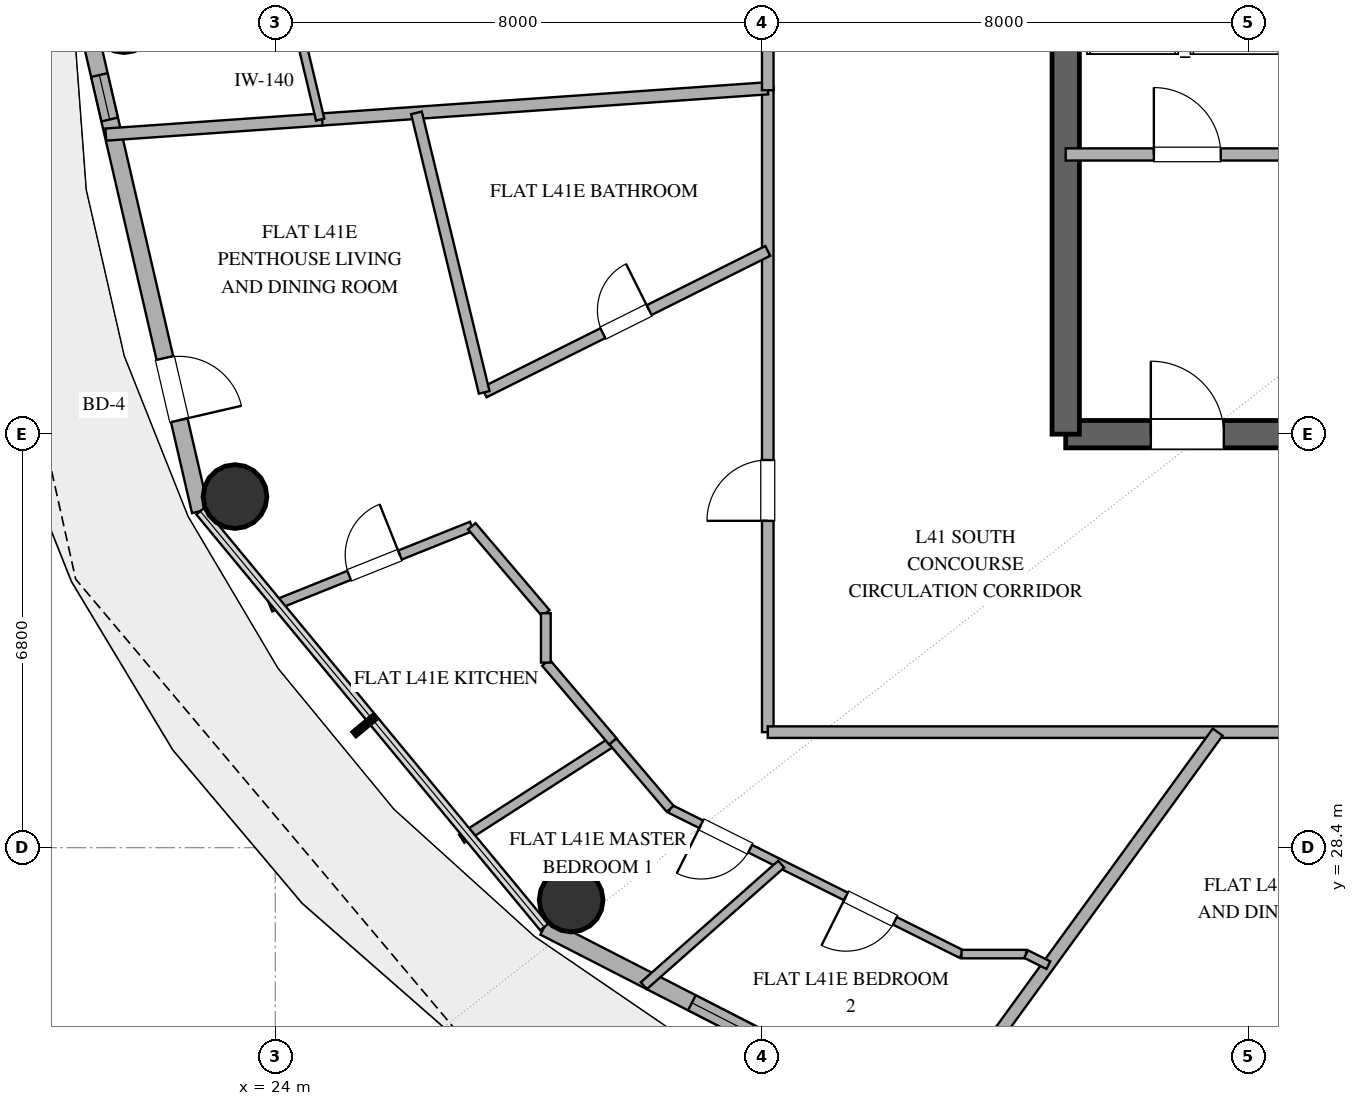
"""IFC4 building model, lengths in metres.
Left out: names, types, materials, properties, quantities, classifications, styles, units other than length and angle.
Written with IfcOpenShell. Run it as: python <this file> out.ifc"""

import sys

from ifc_helpers import new_model, si_unit, direction, frame, frame_2d, origin, origin_2d, place, context, subcontext, project, spatial, rectangle, hollow_circle, extrude, element, fill, save


model = new_model("IFC4")
c1 = context("Model", 3, precision=1e-05, world=origin(), true_north=direction((0.0, 1.0)))
c2 = subcontext(c1, "Body", "Model", "MODEL_VIEW")
j1 = project(units=[si_unit("LENGTHUNIT", "METRE"), si_unit("PLANEANGLEUNIT", "RADIAN")], contexts=[c1])
p1 = place(None, origin())
s1 = spatial("IfcSite", under=j1, at=p1, CompositionType="ELEMENT")
p2 = place(p1, origin())
s2 = spatial("IfcBuilding", under=s1, at=p2, CompositionType="ELEMENT")
p3 = place(p2, frame((0.0, 0.0, 165.0)))
s3 = spatial("IfcBuildingStorey", under=s2, at=p3, CompositionType="ELEMENT", Elevation=165.0)
p4 = place(p3, frame((37.0, 35.2, 0.0), z_axis=(0.0, 0.0, 1.0), x_axis=(1.0, 0.0, 0.0)))
e1 = element("IfcWall", 1, at=p4, inside=s3, PredefinedType="SHEAR", context=c2, shape_type="SweptSolid", body=[
    extrude(rectangle(XDim=4.0, YDim=0.45, at=frame_2d((2.0, 0.0))), origin(), (0.0, 0.0, 1.0), 3.38),
])
p5 = place(p4, frame((1.4, 0.0, 0.0)))
e2 = element("IfcOpeningElement", 2, at=p5, cuts=e1, PredefinedType="OPENING", context=c2, shape_type="SweptSolid", body=[
    extrude(rectangle(XDim=1.2, YDim=2.15, at=frame_2d((0.6, 1.075))), frame((0.0, 0.235, 0.0), z_axis=(0.0, -1.0, 0.0), x_axis=(1.0, 0.0, 0.0)), (0.0, 0.0, 1.0), 0.47),
])
p6 = place(p3, frame((37.0, 35.2, 0.0), z_axis=(0.0, 0.0, 1.0), x_axis=(0.0, 1.0, 0.0)))
e3 = element("IfcWall", 3, at=p6, inside=s3, PredefinedType="SHEAR", context=c2, shape_type="SweptSolid", body=[
    extrude(rectangle(XDim=13.6, YDim=0.45, at=frame_2d((6.8, 0.0))), origin(), (0.0, 0.0, 1.0), 3.38),
])
for number, where, z_axis, x_axis in (
    (4, (21.513, 42.0, 0.0), (0.0, 0.0, 1.0), (1.0, 0.0, 0.0)),
    (5, (23.338, 34.174, 0.0), (0.0, 0.0, 1.0), (1.0, 0.0, 0.0)),
    (6, (28.866, 27.54, 0.0), (0.0, 0.0, 1.0), (1.0, 0.0, 0.0)),
):
    element("IfcColumn", number, at=place(p3, frame(where, z_axis=z_axis, x_axis=x_axis)), inside=s3, PredefinedType="COLUMN", context=c2, shape_type="SweptSolid", body=[
        extrude(hollow_circle(Radius=0.525, WallThickness=0.028, at=origin_2d()), origin(), (0.0, 0.0, 1.0), 3.38),
    ])
p7 = place(p3, frame((20.901, 42.0, 0.0), z_axis=(0.0, 0.0, 1.0), x_axis=(0.225473184558, -0.974249374157, 0.0)))
e7 = element("IfcWall", 7, at=p7, inside=s3, PredefinedType="SOLIDWALL", context=c2, shape_type="SweptSolid", body=[
    extrude(rectangle(XDim=8.28, YDim=0.28, at=frame_2d((4.14, 0.0))), origin(), (0.0, 0.0, 1.0), 3.38),
])
p8 = place(p7, frame((5.694, 0.0, 0.0)))
e8 = element("IfcOpeningElement", 8, at=p8, cuts=e7, PredefinedType="OPENING", context=c2, shape_type="SweptSolid", body=[
    extrude(rectangle(XDim=1.05, YDim=2.2, at=frame_2d((0.525, 1.1))), frame((0.0, 0.15, 0.0), z_axis=(0.0, -1.0, 0.0), x_axis=(1.0, 0.0, 0.0)), (0.0, 0.0, 1.0), 0.3),
])
p9 = place(p7, frame((0.918, 0.0, 0.85)))
e9 = element("IfcOpeningElement", 9, at=p9, cuts=e7, PredefinedType="OPENING", context=c2, shape_type="SweptSolid", body=[
    extrude(rectangle(XDim=0.75, YDim=1.8, at=frame_2d((0.375, 0.9))), frame((0.0, 0.15, 0.0), z_axis=(0.0, -1.0, 0.0), x_axis=(1.0, 0.0, 0.0)), (0.0, 0.0, 1.0), 0.3),
])
p10 = place(p3, frame((28.424, 27.094, 0.0), z_axis=(0.0, 0.0, 1.0), x_axis=(0.889872523182, -0.456209263919, 0.0)))
e10 = element("IfcWall", 10, at=p10, inside=s3, PredefinedType="SOLIDWALL", context=c2, shape_type="SweptSolid", body=[
    extrude(rectangle(XDim=10.016, YDim=0.28, at=frame_2d((5.008, 0.0))), origin(), (0.0, 0.0, 1.0), 3.38),
])
p11 = place(p10, frame((2.729, 0.0, 0.85)))
e11 = element("IfcOpeningElement", 11, at=p11, cuts=e10, PredefinedType="OPENING", context=c2, shape_type="SweptSolid", body=[
    extrude(rectangle(XDim=1.5, YDim=1.8, at=frame_2d((0.75, 0.9))), frame((0.0, 0.15, 0.0), z_axis=(0.0, -1.0, 0.0), x_axis=(1.0, 0.0, 0.0)), (0.0, 0.0, 1.0), 0.3),
])
p12 = place(p10, frame((4.811, 0.0, 0.85)))
e12 = element("IfcOpeningElement", 12, at=p12, cuts=e10, PredefinedType="OPENING", context=c2, shape_type="SweptSolid", body=[
    extrude(rectangle(XDim=1.5, YDim=1.8, at=frame_2d((0.75, 0.9))), frame((0.0, 0.15, 0.0), z_axis=(0.0, -1.0, 0.0), x_axis=(1.0, 0.0, 0.0)), (0.0, 0.0, 1.0), 0.3),
])
p13 = place(p10, frame((7.479, 0.0, 0.85)))
e13 = element("IfcOpeningElement", 13, at=p13, cuts=e10, PredefinedType="OPENING", context=c2, shape_type="SweptSolid", body=[
    extrude(rectangle(XDim=1.0, YDim=1.8, at=frame_2d((0.5, 0.9))), frame((0.0, 0.15, 0.0), z_axis=(0.0, -1.0, 0.0), x_axis=(1.0, 0.0, 0.0)), (0.0, 0.0, 1.0), 0.3),
])
p14 = place(p3, frame((37.0, 39.8, 0.0), z_axis=(0.0, 0.0, 1.0), x_axis=(1.0, 0.0, 0.0)))
e14 = element("IfcWall", 14, at=p14, inside=s3, PredefinedType="SOLIDWALL", context=c2, shape_type="SweptSolid", body=[
    extrude(rectangle(XDim=4.0, YDim=0.2, at=frame_2d((2.0, 0.0))), origin(), (0.0, 0.0, 1.0), 2.74),
])
p15 = place(p14, frame((1.45, 0.0, 0.0)))
e15 = element("IfcOpeningElement", 15, at=p15, cuts=e14, PredefinedType="OPENING", context=c2, shape_type="SweptSolid", body=[
    extrude(rectangle(XDim=1.1, YDim=2.15, at=frame_2d((0.55, 1.075))), frame((0.0, 0.11, 0.0), z_axis=(0.0, -1.0, 0.0), x_axis=(1.0, 0.0, 0.0)), (0.0, 0.0, 1.0), 0.22),
])
p16 = place(p3, frame((32.1, 30.3, 0.0), z_axis=(0.0, 0.0, 1.0), x_axis=(0.0, 1.0, 0.0)))
e16 = element("IfcWall", 16, at=p16, inside=s3, PredefinedType="PARTITIONING", context=c2, shape_type="SweptSolid", body=[
    extrude(rectangle(XDim=10.62, YDim=0.19, at=frame_2d((5.31, 0.0))), origin(), (0.0, 0.0, 1.0), 2.74),
])
p17 = place(p16, frame((3.475, 0.0, 0.0)))
e17 = element("IfcOpeningElement", 17, at=p17, cuts=e16, PredefinedType="OPENING", context=c2, shape_type="SweptSolid", body=[
    extrude(rectangle(XDim=1.0, YDim=2.2, at=frame_2d((0.5, 1.1))), frame((0.0, 0.105, 0.0), z_axis=(0.0, -1.0, 0.0), x_axis=(1.0, 0.0, 0.0)), (0.0, 0.0, 1.0), 0.21),
])
p18 = place(p3, frame((48.308, 30.3, 0.0), z_axis=(0.0, 0.0, 1.0), x_axis=(-1.0, 0.0, 0.0)))
e18 = element("IfcWall", 18, at=p18, inside=s3, PredefinedType="PARTITIONING", context=c2, shape_type="SweptSolid", body=[
    extrude(rectangle(XDim=16.208, YDim=0.19, at=frame_2d((8.104, 0.0))), origin(), (0.0, 0.0, 1.0), 2.74),
])
p19 = place(p18, frame((5.52, 0.0, 0.0)))
e19 = element("IfcOpeningElement", 19, at=p19, cuts=e18, PredefinedType="OPENING", context=c2, shape_type="SweptSolid", body=[
    extrude(rectangle(XDim=1.0, YDim=2.2, at=frame_2d((0.5, 1.1))), frame((0.0, 0.105, 0.0), z_axis=(0.0, -1.0, 0.0), x_axis=(1.0, 0.0, 0.0)), (0.0, 0.0, 1.0), 0.21),
])
p20 = place(p3, frame((32.1, 40.888, 0.0), z_axis=(0.0, 0.0, 1.0), x_axis=(-0.997562906323, -0.069772830877, 0.0)))
e20 = element("IfcWall", 20, at=p20, inside=s3, PredefinedType="PARTITIONING", context=c2, shape_type="SweptSolid", body=[
    extrude(rectangle(XDim=7.38, YDim=0.2, at=frame_2d((3.69, 0.0))), origin(), (0.0, 0.0, 1.0), 2.74),
])
p21 = place(p3, frame((32.1, 40.856, 0.0), z_axis=(0.0, 0.0, 1.0), x_axis=(0.0, 1.0, 0.0)))
e21 = element("IfcWall", 21, at=p21, inside=s3, PredefinedType="PARTITIONING", context=c2, shape_type="SweptSolid", body=[
    extrude(rectangle(XDim=12.844, YDim=0.19, at=frame_2d((6.422, 0.0))), origin(), (0.0, 0.0, 1.0), 2.74),
])
p22 = place(p3, frame((27.436, 35.887, 0.0), z_axis=(0.0, 0.0, 1.0), x_axis=(0.894857716432, 0.446351506485, 0.0)))
e22 = element("IfcWall", 22, at=p22, inside=s3, PredefinedType="PLUMBINGWALL", context=c2, shape_type="SweptSolid", body=[
    extrude(rectangle(XDim=5.212, YDim=0.18, at=frame_2d((2.606, 0.0))), origin(), (0.0, 0.0, 1.0), 2.74),
])
p23 = place(p22, frame((2.181, 0.0, 0.0)))
e23 = element("IfcOpeningElement", 23, at=p23, cuts=e22, PredefinedType="OPENING", context=c2, shape_type="SweptSolid", body=[
    extrude(rectangle(XDim=0.85, YDim=2.1, at=frame_2d((0.425, 1.05))), frame((0.0, 0.1, 0.0), z_axis=(0.0, -1.0, 0.0), x_axis=(1.0, 0.0, 0.0)), (0.0, 0.0, 1.0), 0.2),
])
p24 = place(p3, frame((34.726, 23.73, 0.0), z_axis=(0.0, 0.0, 1.0), x_axis=(0.587785528328, 0.809016793823, 0.0)))
e24 = element("IfcWall", 24, at=p24, inside=s3, PredefinedType="PARTITIONING", context=c2, shape_type="SweptSolid", body=[
    extrude(rectangle(XDim=8.121, YDim=0.2, at=frame_2d((4.061, 0.0))), origin(), (0.0, 0.0, 1.0), 2.74),
])
p25 = place(p3, frame((26.322, 40.484, 0.0), z_axis=(0.0, 0.0, 1.0), x_axis=(0.235484788327, -0.971878034769, 0.0)))
e25 = element("IfcWall", 25, at=p25, inside=s3, PredefinedType="PLUMBINGWALL", context=c2, shape_type="SweptSolid", body=[
    extrude(rectangle(XDim=4.73, YDim=0.18, at=frame_2d((2.365, 0.0))), origin(), (0.0, 0.0, 1.0), 2.74),
])
p26 = place(p3, frame((23.921, 32.36, 0.0), z_axis=(0.0, 0.0, 1.0), x_axis=(0.928353942887, 0.371697399408, 0.0)))
e26 = element("IfcWall", 26, at=p26, inside=s3, PredefinedType="PLUMBINGWALL", context=c2, shape_type="SweptSolid", body=[
    extrude(rectangle(XDim=3.568, YDim=0.16, at=frame_2d((1.784, 0.0))), origin(), (0.0, 0.0, 1.0), 2.74),
])
p27 = place(p26, frame((1.394, 0.0, 0.0)))
e27 = element("IfcOpeningElement", 27, at=p27, cuts=e26, PredefinedType="OPENING", context=c2, shape_type="SweptSolid", body=[
    extrude(rectangle(XDim=0.9, YDim=2.1, at=frame_2d((0.45, 1.05))), frame((0.0, 0.09, 0.0), z_axis=(0.0, -1.0, 0.0), x_axis=(1.0, 0.0, 0.0)), (0.0, 0.0, 1.0), 0.18),
])
p28 = place(p3, frame((21.212, 40.127, 0.0), z_axis=(0.0, 0.0, 1.0), x_axis=(0.997565256009, 0.069739228586, 0.0)))
e28 = element("IfcWall", 28, at=p28, inside=s3, PredefinedType="PARTITIONING", context=c2, shape_type="SweptSolid", body=[
    extrude(rectangle(XDim=3.567, YDim=0.2, at=frame_2d((1.784, 0.0))), origin(), (0.0, 0.0, 1.0), 2.74),
])
p29 = place(p3, frame((35.287, 26.65, 0.0), z_axis=(0.0, 0.0, 1.0), x_axis=(-0.894937323042, 0.44619187333, 0.0)))
e29 = element("IfcWall", 29, at=p29, inside=s3, PredefinedType="PARTITIONING", context=c2, shape_type="SweptSolid", body=[
    extrude(rectangle(XDim=5.354, YDim=0.14, at=frame_2d((2.677, 0.0))), origin(), (0.0, 0.0, 1.0), 2.74),
])
p30 = place(p29, frame((1.224, 0.0, 0.0)))
e30 = element("IfcOpeningElement", 30, at=p30, cuts=e29, PredefinedType="OPENING", context=c2, shape_type="SweptSolid", body=[
    extrude(rectangle(XDim=0.9, YDim=2.1, at=frame_2d((0.45, 1.05))), frame((0.0, 0.08, 0.0), z_axis=(0.0, -1.0, 0.0), x_axis=(1.0, 0.0, 0.0)), (0.0, 0.0, 1.0), 0.16),
])
p31 = place(p29, frame((3.884, 0.0, 0.0)))
e31 = element("IfcOpeningElement", 31, at=p31, cuts=e29, PredefinedType="OPENING", context=c2, shape_type="SweptSolid", body=[
    extrude(rectangle(XDim=0.9, YDim=2.1, at=frame_2d((0.45, 1.05))), frame((0.0, 0.08, 0.0), z_axis=(0.0, -1.0, 0.0), x_axis=(1.0, 0.0, 0.0)), (0.0, 0.0, 1.0), 0.16),
])
p32 = place(p3, frame((32.321, 28.128, 0.0), z_axis=(0.0, 0.0, 1.0), x_axis=(-0.748956405403, -0.6626192744, 0.0)))
e32 = element("IfcWall", 32, at=p32, inside=s3, PredefinedType="PARTITIONING", context=c2, shape_type="SweptSolid", body=[
    extrude(rectangle(XDim=3.017, YDim=0.15, at=frame_2d((1.509, 0.0))), origin(), (0.0, 0.0, 1.0), 2.74),
])
p33 = place(p3, frame((29.553, 30.146, 0.0), z_axis=(0.0, 0.0, 1.0), x_axis=(-0.841296531109, -0.540573904978, 0.0)))
e33 = element("IfcWall", 33, at=p33, inside=s3, PredefinedType="PLUMBINGWALL", context=c2, shape_type="SweptSolid", body=[
    extrude(rectangle(XDim=2.956, YDim=0.16, at=frame_2d((1.478, 0.0))), origin(), (0.0, 0.0, 1.0), 2.74),
])
p34 = place(p3, frame((27.233, 33.686, 0.0), z_axis=(0.0, 0.0, 1.0), x_axis=(0.648078524475, -0.761573519835, 0.0)))
e34 = element("IfcWall", 34, at=p34, inside=s3, PredefinedType="PLUMBINGWALL", context=c2, shape_type="SweptSolid", body=[
    extrude(rectangle(XDim=1.878, YDim=0.16, at=frame_2d((0.939, 0.0))), origin(), (0.0, 0.0, 1.0), 2.74),
])
p35 = place(p3, frame((28.45, 31.443, 0.0), z_axis=(0.0, 0.0, 1.0), x_axis=(0.64788149294, -0.761741144422, 0.0)))
e35 = element("IfcWall", 35, at=p35, inside=s3, PredefinedType="PLUMBINGWALL", context=c2, shape_type="SweptSolid", body=[
    extrude(rectangle(XDim=1.702, YDim=0.16, at=frame_2d((0.851, 0.0))), origin(), (0.0, 0.0, 1.0), 2.74),
])
p36 = place(p3, frame((24.739, 40.373, 0.0), z_axis=(0.0, 0.0, 1.0), x_axis=(-0.231561310927, 0.972820311919, 0.0)))
e36 = element("IfcWall", 36, at=p36, inside=s3, PredefinedType="PARTITIONING", context=c2, shape_type="SweptSolid", body=[
    extrude(rectangle(XDim=1.672, YDim=0.14, at=frame_2d((0.836, 0.0))), origin(), (0.0, 0.0, 1.0), 2.74),
])
p37 = place(p3, frame((29.553, 30.146, 0.0), z_axis=(0.0, 0.0, 1.0), x_axis=(0.647896934681, -0.761728010533, 0.0)))
e37 = element("IfcWall", 37, at=p37, inside=s3, PredefinedType="PARTITIONING", context=c2, shape_type="SweptSolid", body=[
    extrude(rectangle(XDim=1.454, YDim=0.15, at=frame_2d((0.727, 0.0))), origin(), (0.0, 0.0, 1.0), 2.74),
])
p38 = place(p3, frame((36.349, 26.65, 0.0), z_axis=(0.0, 0.0, 1.0), x_axis=(-1.0, 0.0, 0.0)))
e38 = element("IfcWall", 38, at=p38, inside=s3, PredefinedType="PARTITIONING", context=c2, shape_type="SweptSolid", body=[
    extrude(rectangle(XDim=1.062, YDim=0.14, at=frame_2d((0.531, 0.0))), origin(), (0.0, 0.0, 1.0), 2.74),
])
p39 = place(p3, frame((28.45, 32.256, 0.0), z_axis=(0.0, 0.0, 1.0), x_axis=(0.0, -1.0, 0.0)))
e39 = element("IfcWall", 39, at=p39, inside=s3, PredefinedType="PLUMBINGWALL", context=c2, shape_type="SweptSolid", body=[
    extrude(rectangle(XDim=0.812, YDim=0.16, at=frame_2d((0.406, 0.0))), origin(), (0.0, 0.0, 1.0), 2.74),
])
p40 = place(p3, frame((36.715, 26.468, 0.0), z_axis=(0.0, 0.0, 1.0), x_axis=(-0.895142158028, 0.445780794698, 0.0)))
e40 = element("IfcWall", 40, at=p40, inside=s3, PredefinedType="PARTITIONING", context=c2, shape_type="SweptSolid", body=[
    extrude(rectangle(XDim=0.409, YDim=0.14, at=frame_2d((0.205, 0.0))), origin(), (0.0, 0.0, 1.0), 2.74),
])
p41 = place(p8, origin())
e41 = element("IfcDoor", 41, at=p41, inside=s3, OperationType="SINGLE_SWING_RIGHT", PredefinedType="DOOR", context=c2, shape_type="SweptSolid", body=[
    extrude(rectangle(XDim=1.05, YDim=2.2, at=frame_2d((0.525, 1.1))), frame((0.0, 0.025, 0.0), z_axis=(0.0, -1.0, 0.0), x_axis=(1.0, 0.0, 0.0)), (0.0, 0.0, 1.0), 0.05),
])
fill(e8, e41)
p42 = place(p11, origin())
e42 = element("IfcWindow", 42, at=p42, inside=s3, PartitioningType="SINGLE_PANEL", PredefinedType="WINDOW", context=c2, shape_type="SweptSolid", body=[
    extrude(rectangle(XDim=1.5, YDim=1.8, at=frame_2d((0.75, 0.9))), frame((0.0, 0.03, 0.0), z_axis=(0.0, -1.0, 0.0), x_axis=(1.0, 0.0, 0.0)), (0.0, 0.0, 1.0), 0.06),
])
fill(e11, e42)
p43 = place(p9, origin())
e43 = element("IfcWindow", 43, at=p43, inside=s3, PartitioningType="SINGLE_PANEL", PredefinedType="WINDOW", context=c2, shape_type="SweptSolid", body=[
    extrude(rectangle(XDim=0.75, YDim=1.8, at=frame_2d((0.375, 0.9))), frame((0.0, 0.03, 0.0), z_axis=(0.0, -1.0, 0.0), x_axis=(1.0, 0.0, 0.0)), (0.0, 0.0, 1.0), 0.06),
])
fill(e9, e43)
p44 = place(p5, origin())
e44 = element("IfcDoor", 44, at=p44, inside=s3, OperationType="SINGLE_SWING_LEFT", PredefinedType="DOOR", context=c2, shape_type="SweptSolid", body=[
    extrude(rectangle(XDim=1.2, YDim=2.15, at=frame_2d((0.6, 1.075))), frame((0.0, 0.025, 0.0), z_axis=(0.0, -1.0, 0.0), x_axis=(1.0, 0.0, 0.0)), (0.0, 0.0, 1.0), 0.05),
])
fill(e2, e44)
p45 = place(p15, origin())
e45 = element("IfcDoor", 45, at=p45, inside=s3, OperationType="SINGLE_SWING_LEFT", PredefinedType="DOOR", context=c2, shape_type="SweptSolid", body=[
    extrude(rectangle(XDim=1.1, YDim=2.15, at=frame_2d((0.55, 1.075))), frame((0.0, 0.025, 0.0), z_axis=(0.0, -1.0, 0.0), x_axis=(1.0, 0.0, 0.0)), (0.0, 0.0, 1.0), 0.05),
])
fill(e15, e45)
p46 = place(p17, origin())
e46 = element("IfcDoor", 46, at=p46, inside=s3, OperationType="SINGLE_SWING_LEFT", PredefinedType="DOOR", context=c2, shape_type="SweptSolid", body=[
    extrude(rectangle(XDim=1.0, YDim=2.2, at=frame_2d((0.5, 1.1))), frame((0.0, 0.025, 0.0), z_axis=(0.0, -1.0, 0.0), x_axis=(1.0, 0.0, 0.0)), (0.0, 0.0, 1.0), 0.05),
])
fill(e17, e46)
p47 = place(p23, origin())
e47 = element("IfcDoor", 47, at=p47, inside=s3, OperationType="SINGLE_SWING_RIGHT", PredefinedType="DOOR", context=c2, shape_type="SweptSolid", body=[
    extrude(rectangle(XDim=0.85, YDim=2.1, at=frame_2d((0.425, 1.05))), frame((0.0, 0.025, 0.0), z_axis=(0.0, -1.0, 0.0), x_axis=(1.0, 0.0, 0.0)), (0.0, 0.0, 1.0), 0.05),
])
fill(e23, e47)
p48 = place(p27, origin())
e48 = element("IfcDoor", 48, at=p48, inside=s3, OperationType="SINGLE_SWING_RIGHT", PredefinedType="DOOR", context=c2, shape_type="SweptSolid", body=[
    extrude(rectangle(XDim=0.9, YDim=2.1, at=frame_2d((0.45, 1.05))), frame((0.0, 0.025, 0.0), z_axis=(0.0, -1.0, 0.0), x_axis=(1.0, 0.0, 0.0)), (0.0, 0.0, 1.0), 0.05),
])
fill(e27, e48)
p49 = place(p30, origin())
e49 = element("IfcDoor", 49, at=p49, inside=s3, OperationType="SINGLE_SWING_RIGHT", PredefinedType="DOOR", context=c2, shape_type="SweptSolid", body=[
    extrude(rectangle(XDim=0.9, YDim=2.1, at=frame_2d((0.45, 1.05))), frame((0.0, 0.025, 0.0), z_axis=(0.0, -1.0, 0.0), x_axis=(1.0, 0.0, 0.0)), (0.0, 0.0, 1.0), 0.05),
])
fill(e30, e49)
p50 = place(p31, origin())
e50 = element("IfcDoor", 50, at=p50, inside=s3, OperationType="SINGLE_SWING_RIGHT", PredefinedType="DOOR", context=c2, shape_type="SweptSolid", body=[
    extrude(rectangle(XDim=0.9, YDim=2.1, at=frame_2d((0.45, 1.05))), frame((0.0, 0.025, 0.0), z_axis=(0.0, -1.0, 0.0), x_axis=(1.0, 0.0, 0.0)), (0.0, 0.0, 1.0), 0.05),
])
fill(e31, e50)
save(model, sys.argv[1])
